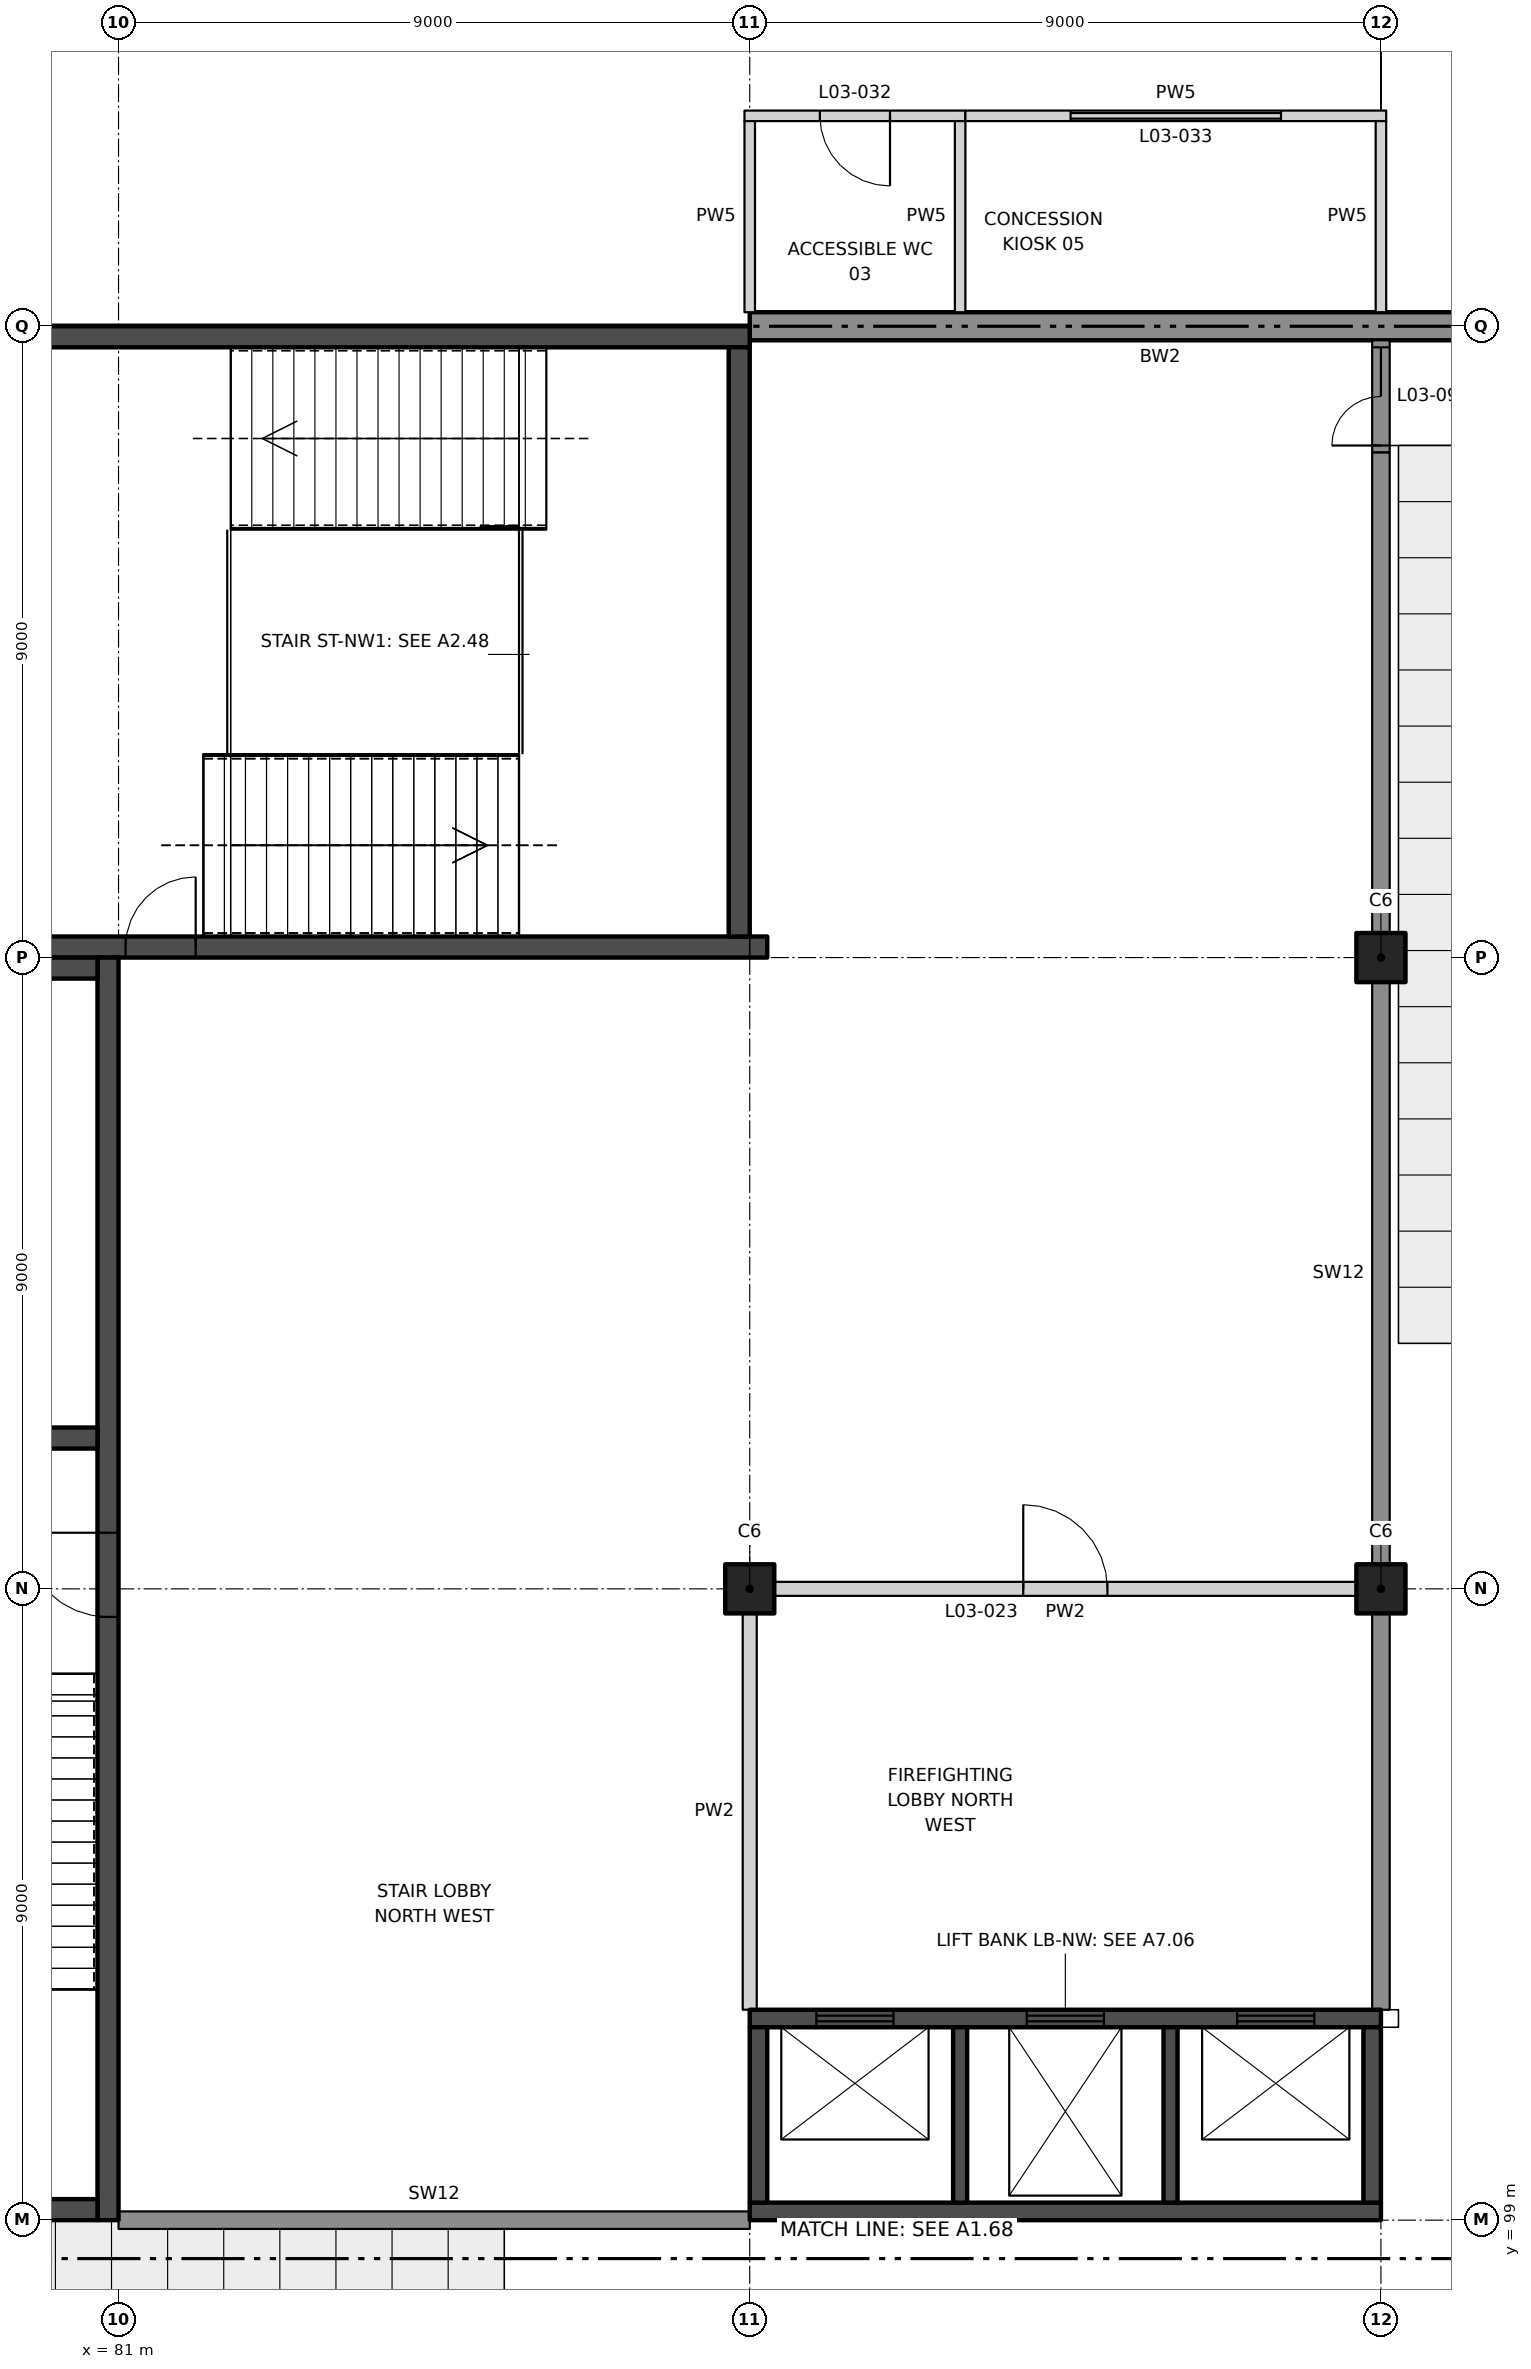
"""IFC4 building model, lengths in metres.
Left out: names, types, materials, properties, quantities, classifications, styles, units other than length and angle.
Written with IfcOpenShell. Run it as: python <this file> out.ifc"""

import sys

from ifc_helpers import new_model, si_unit, direction, frame, frame_2d, origin, origin_2d, place, context, subcontext, project, spatial, rectangle, extrude, element, fill, save


model = new_model("IFC4")
c1 = context("Model", 3, precision=1e-05, world=origin(), true_north=direction((0.0, 1.0)))
c2 = subcontext(c1, "Body", "Model", "MODEL_VIEW")
j1 = project(units=[si_unit("LENGTHUNIT", "METRE"), si_unit("PLANEANGLEUNIT", "RADIAN")], contexts=[c1])
p1 = place(None, origin())
s1 = spatial("IfcSite", under=j1, at=p1, CompositionType="ELEMENT")
p2 = place(p1, origin())
s2 = spatial("IfcBuilding", under=s1, at=p2, CompositionType="ELEMENT")
p3 = place(p2, frame((0.0, 0.0, 22.0)))
s3 = spatial("IfcBuildingStorey", under=s2, at=p3, CompositionType="ELEMENT", Elevation=22.0)
for number, where, z_axis, x_axis in (
    (1, (90.0, 108.0, 0.0), (0.0, 0.0, 1.0), (1.0, 0.0, 0.0)),
    (2, (99.0, 108.0, 0.0), (0.0, 0.0, 1.0), (1.0, 0.0, 0.0)),
    (3, (99.0, 117.0, 0.0), (0.0, 0.0, 1.0), (1.0, 0.0, 0.0)),
):
    element("IfcColumn", number, at=place(p3, frame(where, z_axis=z_axis, x_axis=x_axis)), inside=s3, PredefinedType="COLUMN", context=c2, shape_type="SweptSolid", body=[
        extrude(rectangle(XDim=0.7, YDim=0.7, at=origin_2d()), origin(), (0.0, 0.0, 1.0), 6.0),
    ])
p4 = place(p3, frame((101.7, 126.0, 0.0), z_axis=(0.0, 0.0, 1.0), x_axis=(-1.0, 0.0, 0.0)))
e4 = element("IfcWall", 4, at=p4, inside=s3, PredefinedType="SOLIDWALL", context=c2, shape_type="SweptSolid", body=[
    extrude(rectangle(XDim=11.7, YDim=0.4, at=frame_2d((5.85, 0.0))), origin(), (0.0, 0.0, 1.0), 6.0),
])
p5 = place(p3, frame((90.35, 108.0, 0.0), z_axis=(0.0, 0.0, 1.0), x_axis=(1.0, 0.0, 0.0)))
e5 = element("IfcWall", 5, at=p5, inside=s3, PredefinedType="PARTITIONING", context=c2, shape_type="SweptSolid", body=[
    extrude(rectangle(XDim=8.3, YDim=0.2, at=frame_2d((4.15, 0.0))), origin(), (0.0, 0.0, 1.0), 4.8),
])
p6 = place(p5, frame((3.55, 0.0, 0.0)))
e6 = element("IfcOpeningElement", 6, at=p6, cuts=e5, PredefinedType="OPENING", context=c2, shape_type="SweptSolid", body=[
    extrude(rectangle(XDim=1.2, YDim=2.1, at=frame_2d((0.6, 1.05))), frame((0.0, 0.11, 0.0), z_axis=(0.0, -1.0, 0.0), x_axis=(1.0, 0.0, 0.0)), (0.0, 0.0, 1.0), 0.22),
])
p7 = place(p3, frame((89.925, 129.0, 0.0), z_axis=(0.0, 0.0, 1.0), x_axis=(1.0, 0.0, 0.0)))
e7 = element("IfcWall", 7, at=p7, inside=s3, PredefinedType="PARTITIONING", context=c2, shape_type="SweptSolid", body=[
    extrude(rectangle(XDim=3.15, YDim=0.15, at=frame_2d((1.575, 0.0))), origin(), (0.0, 0.0, 1.0), 6.0),
])
p8 = place(p7, frame((1.075, 0.0, 0.0)))
e8 = element("IfcOpeningElement", 8, at=p8, cuts=e7, PredefinedType="OPENING", context=c2, shape_type="SweptSolid", body=[
    extrude(rectangle(XDim=1.0, YDim=2.1, at=frame_2d((0.5, 1.05))), frame((0.0, 0.085, 0.0), z_axis=(0.0, -1.0, 0.0), x_axis=(1.0, 0.0, 0.0)), (0.0, 0.0, 1.0), 0.17),
])
p9 = place(p3, frame((93.075, 129.0, 0.0), z_axis=(0.0, 0.0, 1.0), x_axis=(1.0, 0.0, 0.0)))
e9 = element("IfcWall", 9, at=p9, inside=s3, PredefinedType="PARTITIONING", context=c2, shape_type="SweptSolid", body=[
    extrude(rectangle(XDim=6.0, YDim=0.15, at=frame_2d((3.0, 0.0))), origin(), (0.0, 0.0, 1.0), 6.0),
])
p10 = place(p9, frame((1.5, 0.0, 0.0)))
e10 = element("IfcOpeningElement", 10, at=p10, cuts=e9, PredefinedType="OPENING", context=c2, shape_type="SweptSolid", body=[
    extrude(rectangle(XDim=3.0, YDim=2.4, at=frame_2d((1.5, 1.2))), frame((0.0, 0.085, 0.0), z_axis=(0.0, -1.0, 0.0), x_axis=(1.0, 0.0, 0.0)), (0.0, 0.0, 1.0), 0.17),
])
p11 = place(p3, frame((90.0, 102.0, 0.0), z_axis=(0.0, 0.0, 1.0), x_axis=(0.0, 1.0, 0.0)))
e11 = element("IfcWall", 11, at=p11, inside=s3, PredefinedType="PARTITIONING", context=c2, shape_type="SweptSolid", body=[
    extrude(rectangle(XDim=5.65, YDim=0.2, at=frame_2d((2.825, 0.0))), origin(), (0.0, 0.0, 1.0), 5.0),
])
p12 = place(p3, frame((90.0, 126.2, 0.0), z_axis=(0.0, 0.0, 1.0), x_axis=(0.0, 1.0, 0.0)))
e12 = element("IfcWall", 12, at=p12, inside=s3, PredefinedType="PARTITIONING", context=c2, shape_type="SweptSolid", body=[
    extrude(rectangle(XDim=2.725, YDim=0.15, at=frame_2d((1.363, 0.0))), origin(), (0.0, 0.0, 1.0), 4.7),
])
p13 = place(p3, frame((93.0, 126.2, 0.0), z_axis=(0.0, 0.0, 1.0), x_axis=(0.0, 1.0, 0.0)))
e13 = element("IfcWall", 13, at=p13, inside=s3, PredefinedType="PARTITIONING", context=c2, shape_type="SweptSolid", body=[
    extrude(rectangle(XDim=2.725, YDim=0.15, at=frame_2d((1.363, 0.0))), origin(), (0.0, 0.0, 1.0), 6.0),
])
p14 = place(p3, frame((99.0, 126.2, 0.0), z_axis=(0.0, 0.0, 1.0), x_axis=(0.0, 1.0, 0.0)))
e14 = element("IfcWall", 14, at=p14, inside=s3, PredefinedType="PARTITIONING", context=c2, shape_type="SweptSolid", body=[
    extrude(rectangle(XDim=2.725, YDim=0.15, at=frame_2d((1.363, 0.0))), origin(), (0.0, 0.0, 1.0), 4.7),
])
p15 = place(p3, frame((90.25, 117.15, 0.0), z_axis=(0.0, 0.0, 1.0), x_axis=(-1.0, 0.0, 0.0)))
e15 = element("IfcWall", 15, at=p15, inside=s3, PredefinedType="SHEAR", context=c2, shape_type="SweptSolid", body=[
    extrude(rectangle(XDim=18.25, YDim=0.3, at=frame_2d((9.125, 0.0))), origin(), (0.0, 0.0, 1.0), 6.0),
])
p16 = place(p15, frame((8.15, 0.0, 0.0)))
e16 = element("IfcOpeningElement", 16, at=p16, cuts=e15, PredefinedType="OPENING", context=c2, shape_type="SweptSolid", body=[
    extrude(rectangle(XDim=1.0, YDim=2.1, at=frame_2d((0.5, 1.05))), frame((0.0, 0.16, 0.0), z_axis=(0.0, -1.0, 0.0), x_axis=(1.0, 0.0, 0.0)), (0.0, 0.0, 1.0), 0.32),
])
p17 = place(p3, frame((90.0, 125.85, 0.0), z_axis=(0.0, 0.0, 1.0), x_axis=(-1.0, 0.0, 0.0)))
e17 = element("IfcWall", 17, at=p17, inside=s3, PredefinedType="SHEAR", context=c2, shape_type="SweptSolid", body=[
    extrude(rectangle(XDim=18.0, YDim=0.3, at=frame_2d((9.0, 0.0))), origin(), (0.0, 0.0, 1.0), 6.0),
])
p18 = place(p3, frame((89.85, 117.3, 0.0), z_axis=(0.0, 0.0, 1.0), x_axis=(0.0, 1.0, 0.0)))
e18 = element("IfcWall", 18, at=p18, inside=s3, PredefinedType="SHEAR", context=c2, shape_type="SweptSolid", body=[
    extrude(rectangle(XDim=8.4, YDim=0.3, at=frame_2d((4.2, 0.0))), origin(), (0.0, 0.0, 1.0), 6.0),
])
p19 = place(p3, frame((80.85, 99.0, 0.0), z_axis=(0.0, 0.0, 1.0), x_axis=(0.0, 1.0, 0.0)))
e19 = element("IfcWall", 19, at=p19, inside=s3, PredefinedType="SHEAR", context=c2, shape_type="SweptSolid", body=[
    extrude(rectangle(XDim=18.0, YDim=0.3, at=frame_2d((9.0, 0.0))), origin(), (0.0, 0.0, 1.0), 6.0),
])
p20 = place(p19, frame((8.6, 0.0, 0.0)))
e20 = element("IfcOpeningElement", 20, at=p20, cuts=e19, PredefinedType="OPENING", context=c2, shape_type="SweptSolid", body=[
    extrude(rectangle(XDim=1.2, YDim=2.1, at=frame_2d((0.6, 1.05))), frame((0.0, 0.16, 0.0), z_axis=(0.0, -1.0, 0.0), x_axis=(1.0, 0.0, 0.0)), (0.0, 0.0, 1.0), 0.32),
])
for number, where, z_axis, x_axis in (
    (21, (80.7, 99.15, 0.0), (0.0, 0.0, 1.0), (-1.0, 0.0, 0.0)),
    (22, (80.7, 116.85, 0.0), (0.0, 0.0, 1.0), (-1.0, 0.0, 0.0)),
    (23, (80.7, 110.15, 0.0), (0.0, 0.0, 1.0), (-1.0, 0.0, 0.0)),
):
    element("IfcWall", number, at=place(p3, frame(where, z_axis=z_axis, x_axis=x_axis)), inside=s3, PredefinedType="SHEAR", context=c2, shape_type="SweptSolid", body=[
        extrude(rectangle(XDim=8.4, YDim=0.3, at=frame_2d((4.2, 0.0))), origin(), (0.0, 0.0, 1.0), 6.0),
    ])
p21 = place(p3, frame((90.0, 101.875, 0.0), z_axis=(0.0, 0.0, 1.0), x_axis=(1.0, 0.0, 0.0)))
e24 = element("IfcWall", 24, at=p21, inside=s3, PredefinedType="SHEAR", context=c2, shape_type="SweptSolid", body=[
    extrude(rectangle(XDim=9.0, YDim=0.25, at=frame_2d((4.5, 0.0))), origin(), (0.0, 0.0, 1.0), 6.0),
])
p22 = place(p21, frame((0.95, 0.0, 0.0)))
e25 = element("IfcOpeningElement", 25, at=p22, cuts=e24, PredefinedType="OPENING", context=c2, shape_type="SweptSolid", body=[
    extrude(rectangle(XDim=1.1, YDim=2.1, at=frame_2d((0.55, 1.05))), frame((0.0, 0.135, 0.0), z_axis=(0.0, -1.0, 0.0), x_axis=(1.0, 0.0, 0.0)), (0.0, 0.0, 1.0), 0.27),
])
p23 = place(p21, frame((3.95, 0.0, 0.0)))
e26 = element("IfcOpeningElement", 26, at=p23, cuts=e24, PredefinedType="OPENING", context=c2, shape_type="SweptSolid", body=[
    extrude(rectangle(XDim=1.1, YDim=2.1, at=frame_2d((0.55, 1.05))), frame((0.0, 0.135, 0.0), z_axis=(0.0, -1.0, 0.0), x_axis=(1.0, 0.0, 0.0)), (0.0, 0.0, 1.0), 0.27),
])
p24 = place(p21, frame((6.95, 0.0, 0.0)))
e27 = element("IfcOpeningElement", 27, at=p24, cuts=e24, PredefinedType="OPENING", context=c2, shape_type="SweptSolid", body=[
    extrude(rectangle(XDim=1.1, YDim=2.1, at=frame_2d((0.55, 1.05))), frame((0.0, 0.135, 0.0), z_axis=(0.0, -1.0, 0.0), x_axis=(1.0, 0.0, 0.0)), (0.0, 0.0, 1.0), 0.27),
])
p25 = place(p3, frame((90.0, 99.125, 0.0), z_axis=(0.0, 0.0, 1.0), x_axis=(1.0, 0.0, 0.0)))
e28 = element("IfcWall", 28, at=p25, inside=s3, PredefinedType="SHEAR", context=c2, shape_type="SweptSolid", body=[
    extrude(rectangle(XDim=9.0, YDim=0.25, at=frame_2d((4.5, 0.0))), origin(), (0.0, 0.0, 1.0), 6.0),
])
for number, where, z_axis, x_axis in (
    (29, (90.125, 99.25, 0.0), (0.0, 0.0, 1.0), (0.0, 1.0, 0.0)),
    (30, (98.875, 99.25, 0.0), (0.0, 0.0, 1.0), (0.0, 1.0, 0.0)),
):
    element("IfcWall", number, at=place(p3, frame(where, z_axis=z_axis, x_axis=x_axis)), inside=s3, PredefinedType="SHEAR", context=c2, shape_type="SweptSolid", body=[
        extrude(rectangle(XDim=2.5, YDim=0.25, at=frame_2d((1.25, 0.0))), origin(), (0.0, 0.0, 1.0), 6.0),
    ])
for number, where, z_axis, x_axis in (
    (31, (93.0, 99.25, 0.0), (0.0, 0.0, 1.0), (0.0, 1.0, 0.0)),
    (32, (96.0, 99.25, 0.0), (0.0, 0.0, 1.0), (0.0, 1.0, 0.0)),
):
    element("IfcWall", number, at=place(p3, frame(where, z_axis=z_axis, x_axis=x_axis)), inside=s3, PredefinedType="SHEAR", context=c2, shape_type="SweptSolid", body=[
        extrude(rectangle(XDim=2.5, YDim=0.2, at=frame_2d((1.25, 0.0))), origin(), (0.0, 0.0, 1.0), 6.0),
    ])
p26 = place(p3, frame((99.0, 124.2, 0.0), z_axis=(0.0, 0.0, 1.0), x_axis=(0.0, 1.0, 0.0)))
e33 = element("IfcWall", 33, at=p26, inside=s3, PredefinedType="SOLIDWALL", context=c2, shape_type="SweptSolid", body=[
    extrude(rectangle(XDim=1.6, YDim=0.25, at=frame_2d((0.8, 0.0))), origin(), (0.0, 0.0, 1.0), 4.8),
])
p27 = place(p26, frame((0.1, 0.0, 0.0)))
e34 = element("IfcOpeningElement", 34, at=p27, cuts=e33, PredefinedType="OPENING", context=c2, shape_type="SweptSolid", body=[
    extrude(rectangle(XDim=1.4, YDim=2.4, at=frame_2d((0.7, 1.2))), frame((0.0, 0.135, 0.0), z_axis=(0.0, -1.0, 0.0), x_axis=(1.0, 0.0, 0.0)), (0.0, 0.0, 1.0), 0.27),
])
p28 = place(p3, frame((99.0, 102.0, 0.0), z_axis=(0.0, 0.0, 1.0), x_axis=(0.0, 1.0, 0.0)))
e35 = element("IfcWall", 35, at=p28, inside=s3, PredefinedType="SOLIDWALL", context=c2, shape_type="SweptSolid", body=[
    extrude(rectangle(XDim=5.65, YDim=0.25, at=frame_2d((2.825, 0.0))), origin(), (0.0, 0.0, 1.0), 5.0),
])
p29 = place(p3, frame((99.0, 108.35, 0.0), z_axis=(0.0, 0.0, 1.0), x_axis=(0.0, 1.0, 0.0)))
e36 = element("IfcWall", 36, at=p29, inside=s3, PredefinedType="SOLIDWALL", context=c2, shape_type="SweptSolid", body=[
    extrude(rectangle(XDim=8.3, YDim=0.25, at=frame_2d((4.15, 0.0))), origin(), (0.0, 0.0, 1.0), 4.8),
])
p30 = place(p3, frame((99.0, 117.35, 0.0), z_axis=(0.0, 0.0, 1.0), x_axis=(0.0, 1.0, 0.0)))
e37 = element("IfcWall", 37, at=p30, inside=s3, PredefinedType="SOLIDWALL", context=c2, shape_type="SweptSolid", body=[
    extrude(rectangle(XDim=6.85, YDim=0.25, at=frame_2d((3.425, 0.0))), origin(), (0.0, 0.0, 1.0), 4.8),
])
p31 = place(p3, frame((81.0, 99.0, 0.0), z_axis=(0.0, 0.0, 1.0), x_axis=(1.0, 0.0, 0.0)))
e38 = element("IfcWall", 38, at=p31, inside=s3, PredefinedType="SOLIDWALL", context=c2, shape_type="SweptSolid", body=[
    extrude(rectangle(XDim=9.0, YDim=0.25, at=frame_2d((4.5, 0.0))), origin(), (0.0, 0.0, 1.0), 4.7),
])
p32 = place(p6, origin())
e39 = element("IfcDoor", 39, at=p32, inside=s3, OperationType="SINGLE_SWING_LEFT", PredefinedType="DOOR", context=c2, shape_type="SweptSolid", body=[
    extrude(rectangle(XDim=1.2, YDim=2.1, at=frame_2d((0.6, 1.05))), frame((0.0, 0.025, 0.0), z_axis=(0.0, -1.0, 0.0), x_axis=(1.0, 0.0, 0.0)), (0.0, 0.0, 1.0), 0.05),
])
fill(e6, e39)
p33 = place(p8, frame((1.0, 0.0, 0.0), z_axis=(0.0, 0.0, 1.0), x_axis=(-1.0, 0.0, 0.0)))
e40 = element("IfcDoor", 40, at=p33, inside=s3, OperationType="SINGLE_SWING_LEFT", PredefinedType="DOOR", context=c2, shape_type="SweptSolid", body=[
    extrude(rectangle(XDim=1.0, YDim=2.1, at=frame_2d((0.5, 1.05))), frame((0.0, 0.025, 0.0), z_axis=(0.0, -1.0, 0.0), x_axis=(1.0, 0.0, 0.0)), (0.0, 0.0, 1.0), 0.05),
])
fill(e8, e40)
p34 = place(p10, origin())
e41 = element("IfcDoor", 41, at=p34, inside=s3, OperationType="ROLLINGUP", PredefinedType="DOOR", context=c2, shape_type="SweptSolid", body=[
    extrude(rectangle(XDim=3.0, YDim=2.4, at=frame_2d((1.5, 1.2))), frame((0.0, 0.025, 0.0), z_axis=(0.0, -1.0, 0.0), x_axis=(1.0, 0.0, 0.0)), (0.0, 0.0, 1.0), 0.05),
])
fill(e10, e41)
p35 = place(p16, frame((1.0, 0.0, 0.0), z_axis=(0.0, 0.0, 1.0), x_axis=(-1.0, 0.0, 0.0)))
e42 = element("IfcDoor", 42, at=p35, inside=s3, OperationType="SINGLE_SWING_RIGHT", PredefinedType="DOOR", context=c2, shape_type="SweptSolid", body=[
    extrude(rectangle(XDim=1.0, YDim=2.1, at=frame_2d((0.5, 1.05))), frame((0.0, 0.025, 0.0), z_axis=(0.0, -1.0, 0.0), x_axis=(1.0, 0.0, 0.0)), (0.0, 0.0, 1.0), 0.05),
])
fill(e16, e42)
p36 = place(p20, origin())
e43 = element("IfcDoor", 43, at=p36, inside=s3, OperationType="SINGLE_SWING_RIGHT", PredefinedType="DOOR", context=c2, shape_type="SweptSolid", body=[
    extrude(rectangle(XDim=1.2, YDim=2.1, at=frame_2d((0.6, 1.05))), frame((0.0, 0.025, 0.0), z_axis=(0.0, -1.0, 0.0), x_axis=(1.0, 0.0, 0.0)), (0.0, 0.0, 1.0), 0.05),
])
fill(e20, e43)
p37 = place(p22, origin())
e44 = element("IfcDoor", 44, at=p37, inside=s3, OperationType="DOUBLE_DOOR_SLIDING", PredefinedType="DOOR", context=c2, shape_type="SweptSolid", body=[
    extrude(rectangle(XDim=1.1, YDim=2.1, at=frame_2d((0.55, 1.05))), frame((0.0, 0.025, 0.0), z_axis=(0.0, -1.0, 0.0), x_axis=(1.0, 0.0, 0.0)), (0.0, 0.0, 1.0), 0.05),
])
fill(e25, e44)
p38 = place(p23, origin())
e45 = element("IfcDoor", 45, at=p38, inside=s3, OperationType="DOUBLE_DOOR_SLIDING", PredefinedType="DOOR", context=c2, shape_type="SweptSolid", body=[
    extrude(rectangle(XDim=1.1, YDim=2.1, at=frame_2d((0.55, 1.05))), frame((0.0, 0.025, 0.0), z_axis=(0.0, -1.0, 0.0), x_axis=(1.0, 0.0, 0.0)), (0.0, 0.0, 1.0), 0.05),
])
fill(e26, e45)
p39 = place(p24, origin())
e46 = element("IfcDoor", 46, at=p39, inside=s3, OperationType="DOUBLE_DOOR_SLIDING", PredefinedType="DOOR", context=c2, shape_type="SweptSolid", body=[
    extrude(rectangle(XDim=1.1, YDim=2.1, at=frame_2d((0.55, 1.05))), frame((0.0, 0.025, 0.0), z_axis=(0.0, -1.0, 0.0), x_axis=(1.0, 0.0, 0.0)), (0.0, 0.0, 1.0), 0.05),
])
fill(e27, e46)
p40 = place(p27, origin())
e47 = element("IfcDoor", 47, at=p40, inside=s3, OperationType="DOUBLE_DOOR_SINGLE_SWING", PredefinedType="DOOR", context=c2, shape_type="SweptSolid", body=[
    extrude(rectangle(XDim=1.4, YDim=2.4, at=frame_2d((0.7, 1.2))), frame((0.0, 0.025, 0.0), z_axis=(0.0, -1.0, 0.0), x_axis=(1.0, 0.0, 0.0)), (0.0, 0.0, 1.0), 0.05),
])
fill(e34, e47)
save(model, sys.argv[1])
